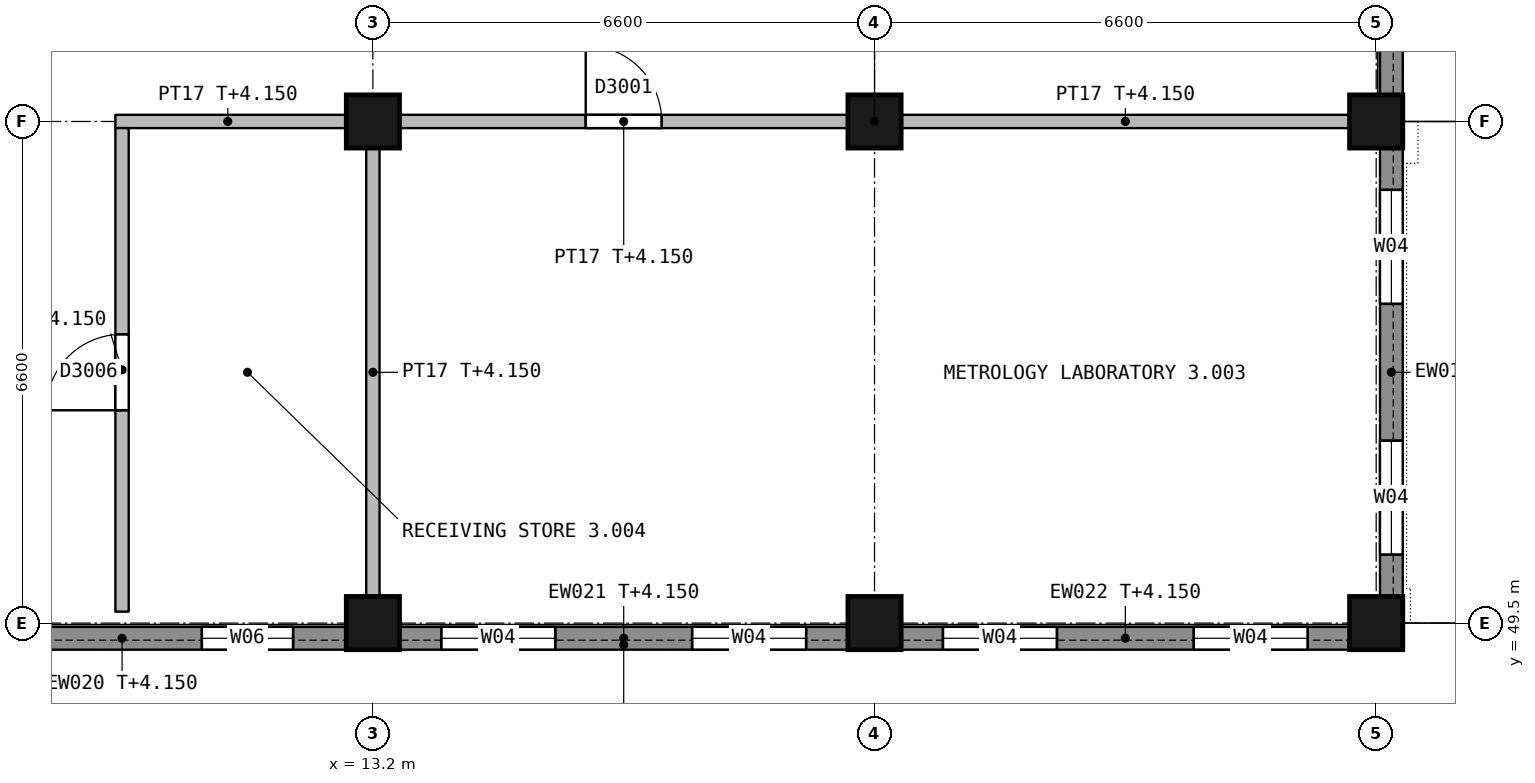
"""IFC4 building model, lengths in metres.
Left out: names, types, materials, properties, quantities, classifications, styles, units other than length and angle.
Written with IfcOpenShell. Run it as: python <this file> out.ifc"""

import sys

from ifc_helpers import new_model, si_unit, direction, frame, frame_2d, origin, origin_2d, place, context, subcontext, project, spatial, rectangle, extrude, element, fill, save


model = new_model("IFC4")
c1 = context("Model", 3, precision=1e-05, world=origin(), true_north=direction((0.0, 1.0)))
c2 = subcontext(c1, "Body", "Model", "MODEL_VIEW")
j1 = project(units=[si_unit("LENGTHUNIT", "METRE"), si_unit("PLANEANGLEUNIT", "RADIAN")], contexts=[c1])
p1 = place(None, origin())
s1 = spatial("IfcSite", under=j1, at=p1, CompositionType="ELEMENT")
p2 = place(p1, origin())
s2 = spatial("IfcBuilding", under=s1, at=p2, CompositionType="ELEMENT")
p3 = place(p2, origin())
s3 = spatial("IfcBuildingStorey", under=s2, at=p3, CompositionType="ELEMENT", Elevation=0.0)
for number, where, z_axis, x_axis in (
    (1, (13.2, 49.5, 0.0), (0.0, 0.0, 1.0), (1.0, 0.0, 0.0)),
    (2, (13.2, 56.1, 0.0), (0.0, 0.0, 1.0), (1.0, 0.0, 0.0)),
    (3, (19.8, 49.5, 0.0), (0.0, 0.0, 1.0), (1.0, 0.0, 0.0)),
    (4, (19.8, 56.1, 0.0), (0.0, 0.0, 1.0), (1.0, 0.0, 0.0)),
    (5, (26.4, 49.5, 0.0), (0.0, 0.0, 1.0), (1.0, 0.0, 0.0)),
    (6, (26.4, 56.1, 0.0), (0.0, 0.0, 1.0), (1.0, 0.0, 0.0)),
):
    element("IfcColumn", number, at=place(p3, frame(where, z_axis=z_axis, x_axis=x_axis)), inside=s3, PredefinedType="COLUMN", context=c2, shape_type="SweptSolid", body=[
        extrude(rectangle(XDim=0.7, YDim=0.7, at=origin_2d()), origin(), (0.0, 0.0, 1.0), 5.4),
    ])
p4 = place(p3, frame((26.6, 55.75, 0.0), z_axis=(0.0, 0.0, 1.0), x_axis=(0.0, -1.0, 0.0)))
e7 = element("IfcWall", 7, at=p4, inside=s3, PredefinedType="STANDARD", context=c2, shape_type="SweptSolid", body=[
    extrude(rectangle(XDim=5.9, YDim=0.3, at=frame_2d((2.95, 0.0))), origin(), (0.0, 0.0, 1.0), 4.15),
])
p5 = place(p4, frame((3.85, 0.0, 1.2)))
e8 = element("IfcOpeningElement", 8, at=p5, cuts=e7, PredefinedType="OPENING", context=c2, shape_type="SweptSolid", body=[
    extrude(rectangle(XDim=1.5, YDim=1.2, at=frame_2d((0.75, 0.6))), frame((0.0, 0.16, 0.0), z_axis=(0.0, -1.0, 0.0), x_axis=(1.0, 0.0, 0.0)), (0.0, 0.0, 1.0), 0.32),
])
p6 = place(p4, frame((0.55, 0.0, 1.2)))
e9 = element("IfcOpeningElement", 9, at=p6, cuts=e7, PredefinedType="OPENING", context=c2, shape_type="SweptSolid", body=[
    extrude(rectangle(XDim=1.5, YDim=1.2, at=frame_2d((0.75, 0.6))), frame((0.0, 0.16, 0.0), z_axis=(0.0, -1.0, 0.0), x_axis=(1.0, 0.0, 0.0)), (0.0, 0.0, 1.0), 0.32),
])
p7 = place(p3, frame((26.6, 62.35, 0.0), z_axis=(0.0, 0.0, 1.0), x_axis=(0.0, -1.0, 0.0)))
e10 = element("IfcWall", 10, at=p7, inside=s3, PredefinedType="STANDARD", context=c2, shape_type="SweptSolid", body=[
    extrude(rectangle(XDim=5.9, YDim=0.3, at=frame_2d((2.95, 0.0))), origin(), (0.0, 0.0, 1.0), 4.15),
])
p8 = place(p3, frame((12.85, 49.3, 0.0), z_axis=(0.0, 0.0, 1.0), x_axis=(-1.0, 0.0, 0.0)))
e11 = element("IfcWall", 11, at=p8, inside=s3, PredefinedType="STANDARD", context=c2, shape_type="SweptSolid", body=[
    extrude(rectangle(XDim=5.9, YDim=0.3, at=frame_2d((2.95, 0.0))), origin(), (0.0, 0.0, 1.0), 4.15),
])
p9 = place(p8, frame((4.0, 0.0, 1.1)))
e12 = element("IfcOpeningElement", 12, at=p9, cuts=e11, PredefinedType="OPENING", context=c2, shape_type="SweptSolid", body=[
    extrude(rectangle(XDim=1.2, YDim=1.2, at=frame_2d((0.6, 0.6))), frame((0.0, 0.16, 0.0), z_axis=(0.0, -1.0, 0.0), x_axis=(1.0, 0.0, 0.0)), (0.0, 0.0, 1.0), 0.32),
])
p10 = place(p8, frame((0.7, 0.0, 2.4)))
e13 = element("IfcOpeningElement", 13, at=p10, cuts=e11, PredefinedType="OPENING", context=c2, shape_type="SweptSolid", body=[
    extrude(rectangle(XDim=1.2, YDim=0.6, at=frame_2d((0.6, 0.3))), frame((0.0, 0.16, 0.0), z_axis=(0.0, -1.0, 0.0), x_axis=(1.0, 0.0, 0.0)), (0.0, 0.0, 1.0), 0.32),
])
p11 = place(p3, frame((19.45, 49.3, 0.0), z_axis=(0.0, 0.0, 1.0), x_axis=(-1.0, 0.0, 0.0)))
e14 = element("IfcWall", 14, at=p11, inside=s3, PredefinedType="STANDARD", context=c2, shape_type="SweptSolid", body=[
    extrude(rectangle(XDim=5.9, YDim=0.3, at=frame_2d((2.95, 0.0))), origin(), (0.0, 0.0, 1.0), 4.15),
])
p12 = place(p11, frame((3.85, 0.0, 1.2)))
e15 = element("IfcOpeningElement", 15, at=p12, cuts=e14, PredefinedType="OPENING", context=c2, shape_type="SweptSolid", body=[
    extrude(rectangle(XDim=1.5, YDim=1.2, at=frame_2d((0.75, 0.6))), frame((0.0, 0.16, 0.0), z_axis=(0.0, -1.0, 0.0), x_axis=(1.0, 0.0, 0.0)), (0.0, 0.0, 1.0), 0.32),
])
p13 = place(p11, frame((0.55, 0.0, 1.2)))
e16 = element("IfcOpeningElement", 16, at=p13, cuts=e14, PredefinedType="OPENING", context=c2, shape_type="SweptSolid", body=[
    extrude(rectangle(XDim=1.5, YDim=1.2, at=frame_2d((0.75, 0.6))), frame((0.0, 0.16, 0.0), z_axis=(0.0, -1.0, 0.0), x_axis=(1.0, 0.0, 0.0)), (0.0, 0.0, 1.0), 0.32),
])
p14 = place(p3, frame((26.05, 49.3, 0.0), z_axis=(0.0, 0.0, 1.0), x_axis=(-1.0, 0.0, 0.0)))
e17 = element("IfcWall", 17, at=p14, inside=s3, PredefinedType="STANDARD", context=c2, shape_type="SweptSolid", body=[
    extrude(rectangle(XDim=5.9, YDim=0.3, at=frame_2d((2.95, 0.0))), origin(), (0.0, 0.0, 1.0), 4.15),
])
p15 = place(p14, frame((3.85, 0.0, 1.2)))
e18 = element("IfcOpeningElement", 18, at=p15, cuts=e17, PredefinedType="OPENING", context=c2, shape_type="SweptSolid", body=[
    extrude(rectangle(XDim=1.5, YDim=1.2, at=frame_2d((0.75, 0.6))), frame((0.0, 0.16, 0.0), z_axis=(0.0, -1.0, 0.0), x_axis=(1.0, 0.0, 0.0)), (0.0, 0.0, 1.0), 0.32),
])
p16 = place(p14, frame((0.55, 0.0, 1.2)))
e19 = element("IfcOpeningElement", 19, at=p16, cuts=e17, PredefinedType="OPENING", context=c2, shape_type="SweptSolid", body=[
    extrude(rectangle(XDim=1.5, YDim=1.2, at=frame_2d((0.75, 0.6))), frame((0.0, 0.16, 0.0), z_axis=(0.0, -1.0, 0.0), x_axis=(1.0, 0.0, 0.0)), (0.0, 0.0, 1.0), 0.32),
])
p17 = place(p3, frame((9.812, 56.1, 0.0), z_axis=(0.0, 0.0, 1.0), x_axis=(1.0, 0.0, 0.0)))
e20 = element("IfcWall", 20, at=p17, inside=s3, PredefinedType="PARTITIONING", context=c2, shape_type="SweptSolid", body=[
    extrude(rectangle(XDim=3.038, YDim=0.175, at=frame_2d((1.519, 0.0))), origin(), (0.0, 0.0, 1.0), 4.15),
])
p18 = place(p3, frame((19.45, 56.1, 0.0), z_axis=(0.0, 0.0, 1.0), x_axis=(-1.0, 0.0, 0.0)))
e21 = element("IfcWall", 21, at=p18, inside=s3, PredefinedType="PARTITIONING", context=c2, shape_type="SweptSolid", body=[
    extrude(rectangle(XDim=5.9, YDim=0.175, at=frame_2d((2.95, 0.0))), origin(), (0.0, 0.0, 1.0), 4.15),
])
p19 = place(p18, frame((2.45, 0.0, 0.0)))
e22 = element("IfcOpeningElement", 22, at=p19, cuts=e21, PredefinedType="OPENING", context=c2, shape_type="SweptSolid", body=[
    extrude(rectangle(XDim=1.0, YDim=2.1, at=frame_2d((0.5, 1.05))), frame((0.0, 0.097, 0.0), z_axis=(0.0, -1.0, 0.0), x_axis=(1.0, 0.0, 0.0)), (0.0, 0.0, 1.0), 0.195),
])
p20 = place(p3, frame((20.15, 56.1, 0.0), z_axis=(0.0, 0.0, 1.0), x_axis=(1.0, 0.0, 0.0)))
e23 = element("IfcWall", 23, at=p20, inside=s3, PredefinedType="PARTITIONING", context=c2, shape_type="SweptSolid", body=[
    extrude(rectangle(XDim=5.9, YDim=0.175, at=frame_2d((2.95, 0.0))), origin(), (0.0, 0.0, 1.0), 4.15),
])
p21 = place(p3, frame((9.9, 56.013, 0.0), z_axis=(0.0, 0.0, 1.0), x_axis=(0.0, -1.0, 0.0)))
e24 = element("IfcWall", 24, at=p21, inside=s3, PredefinedType="PARTITIONING", context=c2, shape_type="SweptSolid", body=[
    extrude(rectangle(XDim=6.363, YDim=0.175, at=frame_2d((3.182, 0.0))), origin(), (0.0, 0.0, 1.0), 4.15),
])
p22 = place(p21, frame((2.713, 0.0, 0.0)))
e25 = element("IfcOpeningElement", 25, at=p22, cuts=e24, PredefinedType="OPENING", context=c2, shape_type="SweptSolid", body=[
    extrude(rectangle(XDim=1.0, YDim=2.1, at=frame_2d((0.5, 1.05))), frame((0.0, 0.097, 0.0), z_axis=(0.0, -1.0, 0.0), x_axis=(1.0, 0.0, 0.0)), (0.0, 0.0, 1.0), 0.195),
])
p23 = place(p3, frame((13.2, 49.85, 0.0), z_axis=(0.0, 0.0, 1.0), x_axis=(0.0, 1.0, 0.0)))
e26 = element("IfcWall", 26, at=p23, inside=s3, PredefinedType="PARTITIONING", context=c2, shape_type="SweptSolid", body=[
    extrude(rectangle(XDim=5.9, YDim=0.175, at=frame_2d((2.95, 0.0))), origin(), (0.0, 0.0, 1.0), 4.15),
])
p24 = place(p5, origin())
e27 = element("IfcWindow", 27, at=p24, inside=s3, PartitioningType="SINGLE_PANEL", PredefinedType="WINDOW", context=c2, shape_type="SweptSolid", body=[
    extrude(rectangle(XDim=1.5, YDim=1.2, at=frame_2d((0.75, 0.6))), frame((0.0, 0.03, 0.0), z_axis=(0.0, -1.0, 0.0), x_axis=(1.0, 0.0, 0.0)), (0.0, 0.0, 1.0), 0.06),
])
fill(e8, e27)
p25 = place(p6, origin())
e28 = element("IfcWindow", 28, at=p25, inside=s3, PartitioningType="SINGLE_PANEL", PredefinedType="WINDOW", context=c2, shape_type="SweptSolid", body=[
    extrude(rectangle(XDim=1.5, YDim=1.2, at=frame_2d((0.75, 0.6))), frame((0.0, 0.03, 0.0), z_axis=(0.0, -1.0, 0.0), x_axis=(1.0, 0.0, 0.0)), (0.0, 0.0, 1.0), 0.06),
])
fill(e9, e28)
p26 = place(p10, origin())
e29 = element("IfcWindow", 29, at=p26, inside=s3, PartitioningType="SINGLE_PANEL", PredefinedType="WINDOW", context=c2, shape_type="SweptSolid", body=[
    extrude(rectangle(XDim=1.2, YDim=0.6, at=frame_2d((0.6, 0.3))), frame((0.0, 0.03, 0.0), z_axis=(0.0, -1.0, 0.0), x_axis=(1.0, 0.0, 0.0)), (0.0, 0.0, 1.0), 0.06),
])
fill(e13, e29)
p27 = place(p12, origin())
e30 = element("IfcWindow", 30, at=p27, inside=s3, PartitioningType="SINGLE_PANEL", PredefinedType="WINDOW", context=c2, shape_type="SweptSolid", body=[
    extrude(rectangle(XDim=1.5, YDim=1.2, at=frame_2d((0.75, 0.6))), frame((0.0, 0.03, 0.0), z_axis=(0.0, -1.0, 0.0), x_axis=(1.0, 0.0, 0.0)), (0.0, 0.0, 1.0), 0.06),
])
fill(e15, e30)
p28 = place(p13, origin())
e31 = element("IfcWindow", 31, at=p28, inside=s3, PartitioningType="SINGLE_PANEL", PredefinedType="WINDOW", context=c2, shape_type="SweptSolid", body=[
    extrude(rectangle(XDim=1.5, YDim=1.2, at=frame_2d((0.75, 0.6))), frame((0.0, 0.03, 0.0), z_axis=(0.0, -1.0, 0.0), x_axis=(1.0, 0.0, 0.0)), (0.0, 0.0, 1.0), 0.06),
])
fill(e16, e31)
p29 = place(p15, origin())
e32 = element("IfcWindow", 32, at=p29, inside=s3, PartitioningType="SINGLE_PANEL", PredefinedType="WINDOW", context=c2, shape_type="SweptSolid", body=[
    extrude(rectangle(XDim=1.5, YDim=1.2, at=frame_2d((0.75, 0.6))), frame((0.0, 0.03, 0.0), z_axis=(0.0, -1.0, 0.0), x_axis=(1.0, 0.0, 0.0)), (0.0, 0.0, 1.0), 0.06),
])
fill(e18, e32)
p30 = place(p16, origin())
e33 = element("IfcWindow", 33, at=p30, inside=s3, PartitioningType="SINGLE_PANEL", PredefinedType="WINDOW", context=c2, shape_type="SweptSolid", body=[
    extrude(rectangle(XDim=1.5, YDim=1.2, at=frame_2d((0.75, 0.6))), frame((0.0, 0.03, 0.0), z_axis=(0.0, -1.0, 0.0), x_axis=(1.0, 0.0, 0.0)), (0.0, 0.0, 1.0), 0.06),
])
fill(e19, e33)
p31 = place(p19, origin())
e34 = element("IfcDoor", 34, at=p31, inside=s3, OperationType="SINGLE_SWING_RIGHT", PredefinedType="DOOR", context=c2, shape_type="SweptSolid", body=[
    extrude(rectangle(XDim=1.0, YDim=2.1, at=frame_2d((0.5, 1.05))), frame((0.0, 0.025, 0.0), z_axis=(0.0, -1.0, 0.0), x_axis=(1.0, 0.0, 0.0)), (0.0, 0.0, 1.0), 0.05),
])
fill(e22, e34)
p32 = place(p22, origin())
e35 = element("IfcDoor", 35, at=p32, inside=s3, OperationType="SINGLE_SWING_RIGHT", PredefinedType="DOOR", context=c2, shape_type="SweptSolid", body=[
    extrude(rectangle(XDim=1.0, YDim=2.1, at=frame_2d((0.5, 1.05))), frame((0.0, 0.025, 0.0), z_axis=(0.0, -1.0, 0.0), x_axis=(1.0, 0.0, 0.0)), (0.0, 0.0, 1.0), 0.05),
])
fill(e25, e35)
save(model, sys.argv[1])
